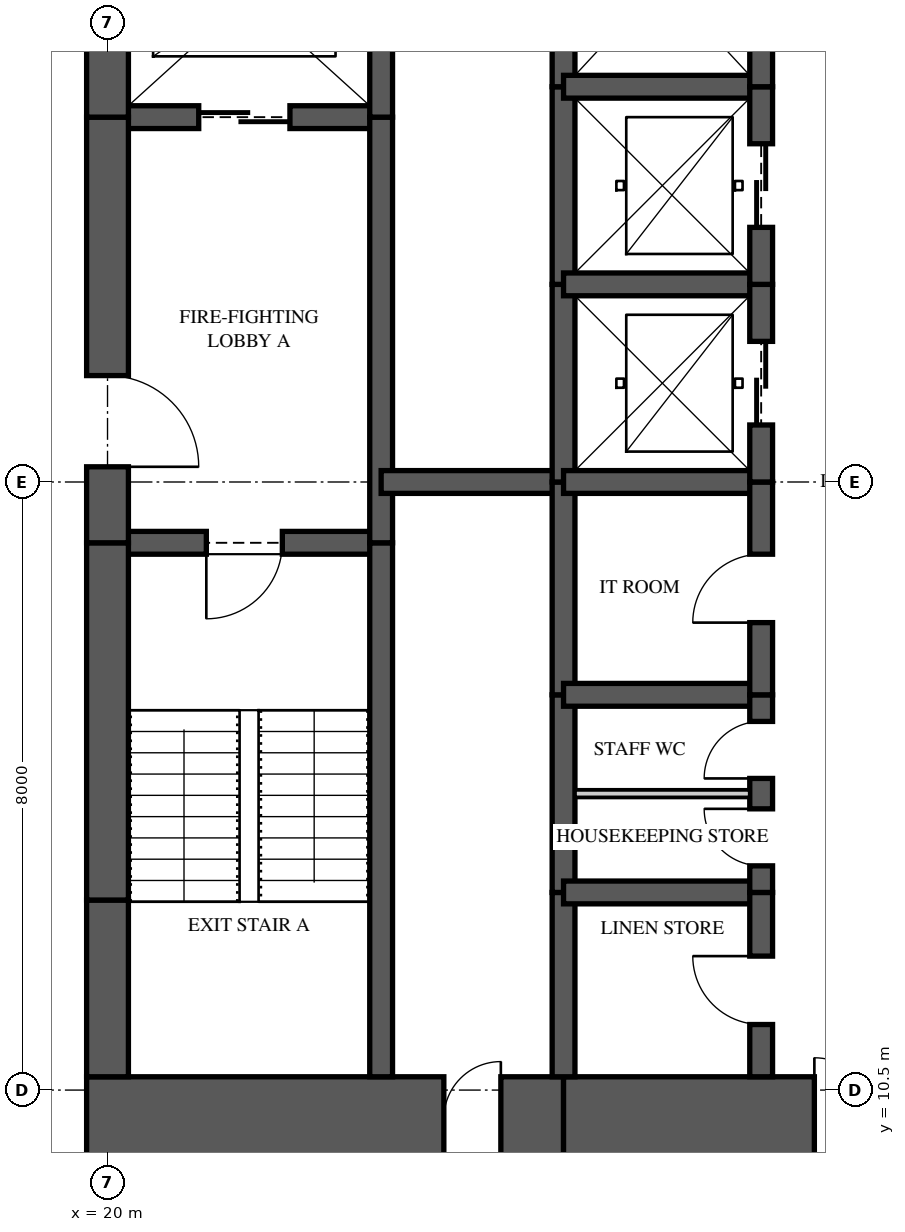
"""IFC4 building model, lengths in metres.
Left out: names, types, materials, properties, quantities, classifications, styles, units other than length and angle.
Written with IfcOpenShell. Run it as: python <this file> out.ifc"""

import sys

from ifc_helpers import new_model, si_unit, direction, frame, frame_2d, origin, place, context, subcontext, project, spatial, rectangle, extrude, element, fill, save


model = new_model("IFC4")
c1 = context("Model", 3, precision=1e-05, world=origin(), true_north=direction((0.0, 1.0)))
c2 = subcontext(c1, "Body", "Model", "MODEL_VIEW")
j1 = project(units=[si_unit("LENGTHUNIT", "METRE"), si_unit("PLANEANGLEUNIT", "RADIAN")], contexts=[c1])
p1 = place(None, origin())
s1 = spatial("IfcSite", under=j1, at=p1, CompositionType="ELEMENT")
p2 = place(p1, origin())
s2 = spatial("IfcBuilding", under=s1, at=p2, CompositionType="ELEMENT")
p3 = place(p2, frame((0.0, 0.0, 245.95)))
s3 = spatial("IfcBuildingStorey", under=s2, at=p3, CompositionType="ELEMENT", Elevation=245.95)
p4 = place(p3, frame((19.725, 10.125, 0.0), z_axis=(0.0, 0.0, 1.0), x_axis=(1.0, 0.0, 0.0)))
e1 = element("IfcWall", 1, at=p4, inside=s3, PredefinedType="SHEAR", context=c2, shape_type="SweptSolid", body=[
    extrude(rectangle(XDim=6.275, YDim=1.1, at=frame_2d((3.137, 0.0))), origin(), (0.0, 0.0, 1.0), 3.5),
])
p5 = place(p4, frame((4.7, 0.0, 0.0)))
e2 = element("IfcOpeningElement", 2, at=p5, cuts=e1, PredefinedType="OPENING", context=c2, shape_type="SweptSolid", body=[
    extrude(rectangle(XDim=0.75, YDim=2.1, at=frame_2d((0.375, 1.05))), frame((0.0, 0.56, 0.0), z_axis=(0.0, -1.0, 0.0), x_axis=(1.0, 0.0, 0.0)), (0.0, 0.0, 1.0), 1.12),
])
p6 = place(p3, frame((26.0, 10.125, 0.0), z_axis=(0.0, 0.0, 1.0), x_axis=(1.0, 0.0, 0.0)))
e3 = element("IfcWall", 3, at=p6, inside=s3, PredefinedType="SHEAR", context=c2, shape_type="SweptSolid", body=[
    extrude(rectangle(XDim=5.6, YDim=1.1, at=frame_2d((2.8, 0.0))), origin(), (0.0, 0.0, 1.0), 3.5),
])
p7 = place(p6, frame((3.3, 0.0, 0.0)))
e4 = element("IfcOpeningElement", 4, at=p7, cuts=e3, PredefinedType="OPENING", context=c2, shape_type="SweptSolid", body=[
    extrude(rectangle(XDim=1.6, YDim=2.1, at=frame_2d((0.8, 1.05))), frame((0.0, 0.56, 0.0), z_axis=(0.0, -1.0, 0.0), x_axis=(1.0, 0.0, 0.0)), (0.0, 0.0, 1.0), 1.12),
])
p8 = place(p3, frame((20.0, 26.325, 0.0), z_axis=(0.0, 0.0, 1.0), x_axis=(0.0, -1.0, 0.0)))
e5 = element("IfcWall", 5, at=p8, inside=s3, PredefinedType="SHEAR", context=c2, shape_type="SweptSolid", body=[
    extrude(rectangle(XDim=3.025, YDim=0.55, at=frame_2d((1.512, 0.0))), origin(), (0.0, 0.0, 1.0), 3.5),
])
p9 = place(p3, frame((20.0, 23.3, 0.0), z_axis=(0.0, 0.0, 1.0), x_axis=(0.0, -1.0, 0.0)))
e6 = element("IfcWall", 6, at=p9, inside=s3, PredefinedType="SHEAR", context=c2, shape_type="SweptSolid", body=[
    extrude(rectangle(XDim=5.6, YDim=0.55, at=frame_2d((2.8, 0.0))), origin(), (0.0, 0.0, 1.0), 3.5),
])
p10 = place(p9, frame((3.4, 0.0, 0.0)))
e7 = element("IfcOpeningElement", 7, at=p10, cuts=e6, PredefinedType="OPENING", context=c2, shape_type="SweptSolid", body=[
    extrude(rectangle(XDim=1.2, YDim=2.2, at=frame_2d((0.6, 1.1))), frame((0.0, 0.285, 0.0), z_axis=(0.0, -1.0, 0.0), x_axis=(1.0, 0.0, 0.0)), (0.0, 0.0, 1.0), 0.57),
])
p11 = place(p3, frame((20.0, 17.7, 0.0), z_axis=(0.0, 0.0, 1.0), x_axis=(0.0, -1.0, 0.0)))
e8 = element("IfcWall", 8, at=p11, inside=s3, PredefinedType="SHEAR", context=c2, shape_type="SweptSolid", body=[
    extrude(rectangle(XDim=4.7, YDim=0.55, at=frame_2d((2.35, 0.0))), origin(), (0.0, 0.0, 1.0), 3.5),
])
p12 = place(p3, frame((20.0, 13.0, 0.0), z_axis=(0.0, 0.0, 1.0), x_axis=(0.0, -1.0, 0.0)))
e9 = element("IfcWall", 9, at=p12, inside=s3, PredefinedType="SHEAR", context=c2, shape_type="SweptSolid", body=[
    extrude(rectangle(XDim=2.325, YDim=0.55, at=frame_2d((1.163, 0.0))), origin(), (0.0, 0.0, 1.0), 3.5),
])
p13 = place(p3, frame((23.6, 10.675, 0.0), z_axis=(0.0, 0.0, 1.0), x_axis=(0.0, 1.0, 0.0)))
e10 = element("IfcWall", 10, at=p13, inside=s3, PredefinedType="SHEAR", context=c2, shape_type="SweptSolid", body=[
    extrude(rectangle(XDim=7.025, YDim=0.3, at=frame_2d((3.512, 0.0))), origin(), (0.0, 0.0, 1.0), 3.5),
])
p14 = place(p3, frame((23.6, 17.7, 0.0), z_axis=(0.0, 0.0, 1.0), x_axis=(0.0, 1.0, 0.0)))
e11 = element("IfcWall", 11, at=p14, inside=s3, PredefinedType="SHEAR", context=c2, shape_type="SweptSolid", body=[
    extrude(rectangle(XDim=5.6, YDim=0.3, at=frame_2d((2.8, 0.0))), origin(), (0.0, 0.0, 1.0), 3.5),
])
p15 = place(p3, frame((23.6, 23.3, 0.0), z_axis=(0.0, 0.0, 1.0), x_axis=(0.0, 1.0, 0.0)))
e12 = element("IfcWall", 12, at=p15, inside=s3, PredefinedType="SHEAR", context=c2, shape_type="SweptSolid", body=[
    extrude(rectangle(XDim=3.025, YDim=0.3, at=frame_2d((1.512, 0.0))), origin(), (0.0, 0.0, 1.0), 3.5),
])
p16 = place(p3, frame((26.0, 10.675, 0.0), z_axis=(0.0, 0.0, 1.0), x_axis=(0.0, 1.0, 0.0)))
e13 = element("IfcWall", 13, at=p16, inside=s3, PredefinedType="SHEAR", context=c2, shape_type="SweptSolid", body=[
    extrude(rectangle(XDim=2.425, YDim=0.3, at=frame_2d((1.212, 0.0))), origin(), (0.0, 0.0, 1.0), 3.5),
])
p17 = place(p3, frame((26.0, 13.1, 0.0), z_axis=(0.0, 0.0, 1.0), x_axis=(0.0, 1.0, 0.0)))
e14 = element("IfcWall", 14, at=p17, inside=s3, PredefinedType="SHEAR", context=c2, shape_type="SweptSolid", body=[
    extrude(rectangle(XDim=2.6, YDim=0.3, at=frame_2d((1.3, 0.0))), origin(), (0.0, 0.0, 1.0), 3.5),
])
p18 = place(p3, frame((26.0, 15.7, 0.0), z_axis=(0.0, 0.0, 1.0), x_axis=(0.0, 1.0, 0.0)))
e15 = element("IfcWall", 15, at=p18, inside=s3, PredefinedType="SHEAR", context=c2, shape_type="SweptSolid", body=[
    extrude(rectangle(XDim=2.8, YDim=0.3, at=frame_2d((1.4, 0.0))), origin(), (0.0, 0.0, 1.0), 3.5),
])
p19 = place(p3, frame((26.0, 18.5, 0.0), z_axis=(0.0, 0.0, 1.0), x_axis=(0.0, 1.0, 0.0)))
e16 = element("IfcWall", 16, at=p19, inside=s3, PredefinedType="SHEAR", context=c2, shape_type="SweptSolid", body=[
    extrude(rectangle(XDim=2.6, YDim=0.3, at=frame_2d((1.3, 0.0))), origin(), (0.0, 0.0, 1.0), 3.5),
])
p20 = place(p3, frame((26.0, 21.1, 0.0), z_axis=(0.0, 0.0, 1.0), x_axis=(0.0, 1.0, 0.0)))
e17 = element("IfcWall", 17, at=p20, inside=s3, PredefinedType="SHEAR", context=c2, shape_type="SweptSolid", body=[
    extrude(rectangle(XDim=2.6, YDim=0.3, at=frame_2d((1.3, 0.0))), origin(), (0.0, 0.0, 1.0), 3.5),
])
p21 = place(p3, frame((26.0, 23.7, 0.0), z_axis=(0.0, 0.0, 1.0), x_axis=(0.0, 1.0, 0.0)))
e18 = element("IfcWall", 18, at=p21, inside=s3, PredefinedType="SHEAR", context=c2, shape_type="SweptSolid", body=[
    extrude(rectangle(XDim=2.625, YDim=0.3, at=frame_2d((1.312, 0.0))), origin(), (0.0, 0.0, 1.0), 3.5),
])
p22 = place(p3, frame((28.6, 10.675, 0.0), z_axis=(0.0, 0.0, 1.0), x_axis=(0.0, 1.0, 0.0)))
e19 = element("IfcWall", 19, at=p22, inside=s3, PredefinedType="SHEAR", context=c2, shape_type="SweptSolid", body=[
    extrude(rectangle(XDim=2.425, YDim=0.3, at=frame_2d((1.212, 0.0))), origin(), (0.0, 0.0, 1.0), 3.5),
])
p23 = place(p22, frame((0.688, 0.0, 0.0)))
e20 = element("IfcOpeningElement", 20, at=p23, cuts=e19, PredefinedType="OPENING", context=c2, shape_type="SweptSolid", body=[
    extrude(rectangle(XDim=0.9, YDim=2.1, at=frame_2d((0.45, 1.05))), frame((0.0, 0.16, 0.0), z_axis=(0.0, -1.0, 0.0), x_axis=(1.0, 0.0, 0.0)), (0.0, 0.0, 1.0), 0.32),
])
p24 = place(p3, frame((28.6, 13.1, 0.0), z_axis=(0.0, 0.0, 1.0), x_axis=(0.0, 1.0, 0.0)))
e21 = element("IfcWall", 21, at=p24, inside=s3, PredefinedType="SHEAR", context=c2, shape_type="SweptSolid", body=[
    extrude(rectangle(XDim=2.6, YDim=0.3, at=frame_2d((1.3, 0.0))), origin(), (0.0, 0.0, 1.0), 3.5),
])
p25 = place(p24, frame((0.35, 0.0, 0.0)))
e22 = element("IfcOpeningElement", 22, at=p25, cuts=e21, PredefinedType="OPENING", context=c2, shape_type="SweptSolid", body=[
    extrude(rectangle(XDim=0.75, YDim=2.1, at=frame_2d((0.375, 1.05))), frame((0.0, 0.16, 0.0), z_axis=(0.0, -1.0, 0.0), x_axis=(1.0, 0.0, 0.0)), (0.0, 0.0, 1.0), 0.32),
])
p26 = place(p24, frame((1.5, 0.0, 0.0)))
e23 = element("IfcOpeningElement", 23, at=p26, cuts=e21, PredefinedType="OPENING", context=c2, shape_type="SweptSolid", body=[
    extrude(rectangle(XDim=0.75, YDim=2.1, at=frame_2d((0.375, 1.05))), frame((0.0, 0.16, 0.0), z_axis=(0.0, -1.0, 0.0), x_axis=(1.0, 0.0, 0.0)), (0.0, 0.0, 1.0), 0.32),
])
p27 = place(p3, frame((28.6, 15.7, 0.0), z_axis=(0.0, 0.0, 1.0), x_axis=(0.0, 1.0, 0.0)))
e24 = element("IfcWall", 24, at=p27, inside=s3, PredefinedType="SHEAR", context=c2, shape_type="SweptSolid", body=[
    extrude(rectangle(XDim=2.8, YDim=0.3, at=frame_2d((1.4, 0.0))), origin(), (0.0, 0.0, 1.0), 3.5),
])
p28 = place(p27, frame((0.95, 0.0, 0.0)))
e25 = element("IfcOpeningElement", 25, at=p28, cuts=e24, PredefinedType="OPENING", context=c2, shape_type="SweptSolid", body=[
    extrude(rectangle(XDim=0.9, YDim=2.1, at=frame_2d((0.45, 1.05))), frame((0.0, 0.16, 0.0), z_axis=(0.0, -1.0, 0.0), x_axis=(1.0, 0.0, 0.0)), (0.0, 0.0, 1.0), 0.32),
])
p29 = place(p3, frame((28.6, 18.5, 0.0), z_axis=(0.0, 0.0, 1.0), x_axis=(0.0, 1.0, 0.0)))
e26 = element("IfcWall", 26, at=p29, inside=s3, PredefinedType="SHEAR", context=c2, shape_type="SweptSolid", body=[
    extrude(rectangle(XDim=2.6, YDim=0.3, at=frame_2d((1.3, 0.0))), origin(), (0.0, 0.0, 1.0), 3.5),
])
p30 = place(p29, frame((0.75, 0.0, 0.0)))
e27 = element("IfcOpeningElement", 27, at=p30, cuts=e26, PredefinedType="OPENING", context=c2, shape_type="SweptSolid", body=[
    extrude(rectangle(XDim=1.1, YDim=2.1, at=frame_2d((0.55, 1.05))), frame((0.0, 0.16, 0.0), z_axis=(0.0, -1.0, 0.0), x_axis=(1.0, 0.0, 0.0)), (0.0, 0.0, 1.0), 0.32),
])
p31 = place(p3, frame((28.6, 21.1, 0.0), z_axis=(0.0, 0.0, 1.0), x_axis=(0.0, 1.0, 0.0)))
e28 = element("IfcWall", 28, at=p31, inside=s3, PredefinedType="SHEAR", context=c2, shape_type="SweptSolid", body=[
    extrude(rectangle(XDim=2.6, YDim=0.3, at=frame_2d((1.3, 0.0))), origin(), (0.0, 0.0, 1.0), 3.5),
])
p32 = place(p31, frame((0.75, 0.0, 0.0)))
e29 = element("IfcOpeningElement", 29, at=p32, cuts=e28, PredefinedType="OPENING", context=c2, shape_type="SweptSolid", body=[
    extrude(rectangle(XDim=1.1, YDim=2.1, at=frame_2d((0.55, 1.05))), frame((0.0, 0.16, 0.0), z_axis=(0.0, -1.0, 0.0), x_axis=(1.0, 0.0, 0.0)), (0.0, 0.0, 1.0), 0.32),
])
p33 = place(p3, frame((28.6, 23.7, 0.0), z_axis=(0.0, 0.0, 1.0), x_axis=(0.0, 1.0, 0.0)))
e30 = element("IfcWall", 30, at=p33, inside=s3, PredefinedType="SHEAR", context=c2, shape_type="SweptSolid", body=[
    extrude(rectangle(XDim=2.625, YDim=0.3, at=frame_2d((1.312, 0.0))), origin(), (0.0, 0.0, 1.0), 3.5),
])
p34 = place(p33, frame((0.85, 0.0, 0.0)))
e31 = element("IfcOpeningElement", 31, at=p34, cuts=e30, PredefinedType="OPENING", context=c2, shape_type="SweptSolid", body=[
    extrude(rectangle(XDim=1.1, YDim=2.1, at=frame_2d((0.55, 1.05))), frame((0.0, 0.16, 0.0), z_axis=(0.0, -1.0, 0.0), x_axis=(1.0, 0.0, 0.0)), (0.0, 0.0, 1.0), 0.32),
])
p35 = place(p3, frame((20.0, 17.7, 0.0), z_axis=(0.0, 0.0, 1.0), x_axis=(1.0, 0.0, 0.0)))
e32 = element("IfcWall", 32, at=p35, inside=s3, PredefinedType="SHEAR", context=c2, shape_type="SweptSolid", body=[
    extrude(rectangle(XDim=3.6, YDim=0.3, at=frame_2d((1.8, 0.0))), origin(), (0.0, 0.0, 1.0), 3.5),
])
p36 = place(p35, frame((1.3, 0.0, 0.0)))
e33 = element("IfcOpeningElement", 33, at=p36, cuts=e32, PredefinedType="OPENING", context=c2, shape_type="SweptSolid", body=[
    extrude(rectangle(XDim=1.0, YDim=2.1, at=frame_2d((0.5, 1.05))), frame((0.0, 0.16, 0.0), z_axis=(0.0, -1.0, 0.0), x_axis=(1.0, 0.0, 0.0)), (0.0, 0.0, 1.0), 0.32),
])
p37 = place(p3, frame((20.0, 23.3, 0.0), z_axis=(0.0, 0.0, 1.0), x_axis=(1.0, 0.0, 0.0)))
e34 = element("IfcWall", 34, at=p37, inside=s3, PredefinedType="SHEAR", context=c2, shape_type="SweptSolid", body=[
    extrude(rectangle(XDim=3.6, YDim=0.3, at=frame_2d((1.8, 0.0))), origin(), (0.0, 0.0, 1.0), 3.5),
])
p38 = place(p37, frame((1.2, 0.0, 0.0)))
e35 = element("IfcOpeningElement", 35, at=p38, cuts=e34, PredefinedType="OPENING", context=c2, shape_type="SweptSolid", body=[
    extrude(rectangle(XDim=1.2, YDim=2.1, at=frame_2d((0.6, 1.05))), frame((0.0, 0.16, 0.0), z_axis=(0.0, -1.0, 0.0), x_axis=(1.0, 0.0, 0.0)), (0.0, 0.0, 1.0), 0.32),
])
p39 = place(p3, frame((23.6, 18.5, 0.0), z_axis=(0.0, 0.0, 1.0), x_axis=(1.0, 0.0, 0.0)))
e36 = element("IfcWall", 36, at=p39, inside=s3, PredefinedType="SHEAR", context=c2, shape_type="SweptSolid", body=[
    extrude(rectangle(XDim=2.4, YDim=0.3, at=frame_2d((1.2, 0.0))), origin(), (0.0, 0.0, 1.0), 3.5),
])
for number, where, z_axis, x_axis in (
    (37, (26.0, 13.1, 0.0), (0.0, 0.0, 1.0), (1.0, 0.0, 0.0)),
    (38, (26.0, 15.7, 0.0), (0.0, 0.0, 1.0), (1.0, 0.0, 0.0)),
    (39, (26.0, 18.5, 0.0), (0.0, 0.0, 1.0), (1.0, 0.0, 0.0)),
    (40, (26.0, 21.1, 0.0), (0.0, 0.0, 1.0), (1.0, 0.0, 0.0)),
    (41, (26.0, 23.7, 0.0), (0.0, 0.0, 1.0), (1.0, 0.0, 0.0)),
):
    element("IfcWall", number, at=place(p3, frame(where, z_axis=z_axis, x_axis=x_axis)), inside=s3, PredefinedType="SHEAR", context=c2, shape_type="SweptSolid", body=[
        extrude(rectangle(XDim=2.6, YDim=0.3, at=frame_2d((1.3, 0.0))), origin(), (0.0, 0.0, 1.0), 3.5),
    ])
p40 = place(p3, frame((26.15, 14.4, 0.0), z_axis=(0.0, 0.0, 1.0), x_axis=(1.0, 0.0, 0.0)))
e42 = element("IfcWall", 42, at=p40, inside=s3, PredefinedType="PARTITIONING", context=c2, shape_type="SweptSolid", body=[
    extrude(rectangle(XDim=2.3, YDim=0.1, at=frame_2d((1.15, 0.0))), origin(), (0.0, 0.0, 1.0), 3.26),
])
p41 = place(p36, frame((1.0, 0.0, 0.0), z_axis=(0.0, 0.0, 1.0), x_axis=(-1.0, 0.0, 0.0)))
e43 = element("IfcDoor", 43, at=p41, inside=s3, OperationType="SINGLE_SWING_RIGHT", PredefinedType="DOOR", context=c2, shape_type="SweptSolid", body=[
    extrude(rectangle(XDim=1.0, YDim=2.1, at=frame_2d((0.5, 1.05))), frame((0.0, 0.025, 0.0), z_axis=(0.0, -1.0, 0.0), x_axis=(1.0, 0.0, 0.0)), (0.0, 0.0, 1.0), 0.05),
])
fill(e33, e43)
p42 = place(p10, origin())
e44 = element("IfcDoor", 44, at=p42, inside=s3, OperationType="SINGLE_SWING_RIGHT", PredefinedType="DOOR", context=c2, shape_type="SweptSolid", body=[
    extrude(rectangle(XDim=1.2, YDim=2.2, at=frame_2d((0.6, 1.1))), frame((0.0, 0.025, 0.0), z_axis=(0.0, -1.0, 0.0), x_axis=(1.0, 0.0, 0.0)), (0.0, 0.0, 1.0), 0.05),
])
fill(e7, e44)
p43 = place(p38, origin())
e45 = element("IfcDoor", 45, at=p43, inside=s3, OperationType="SLIDING_TO_LEFT", PredefinedType="DOOR", context=c2, shape_type="SweptSolid", body=[
    extrude(rectangle(XDim=1.2, YDim=2.1, at=frame_2d((0.6, 1.05))), frame((0.0, 0.025, 0.0), z_axis=(0.0, -1.0, 0.0), x_axis=(1.0, 0.0, 0.0)), (0.0, 0.0, 1.0), 0.05),
])
fill(e35, e45)
p44 = place(p30, origin())
e46 = element("IfcDoor", 46, at=p44, inside=s3, OperationType="SLIDING_TO_LEFT", PredefinedType="DOOR", context=c2, shape_type="SweptSolid", body=[
    extrude(rectangle(XDim=1.1, YDim=2.1, at=frame_2d((0.55, 1.05))), frame((0.0, 0.025, 0.0), z_axis=(0.0, -1.0, 0.0), x_axis=(1.0, 0.0, 0.0)), (0.0, 0.0, 1.0), 0.05),
])
fill(e27, e46)
p45 = place(p32, origin())
e47 = element("IfcDoor", 47, at=p45, inside=s3, OperationType="SLIDING_TO_LEFT", PredefinedType="DOOR", context=c2, shape_type="SweptSolid", body=[
    extrude(rectangle(XDim=1.1, YDim=2.1, at=frame_2d((0.55, 1.05))), frame((0.0, 0.025, 0.0), z_axis=(0.0, -1.0, 0.0), x_axis=(1.0, 0.0, 0.0)), (0.0, 0.0, 1.0), 0.05),
])
fill(e29, e47)
p46 = place(p23, origin())
e48 = element("IfcDoor", 48, at=p46, inside=s3, OperationType="SINGLE_SWING_RIGHT", PredefinedType="DOOR", context=c2, shape_type="SweptSolid", body=[
    extrude(rectangle(XDim=0.9, YDim=2.1, at=frame_2d((0.45, 1.05))), frame((0.0, 0.025, 0.0), z_axis=(0.0, -1.0, 0.0), x_axis=(1.0, 0.0, 0.0)), (0.0, 0.0, 1.0), 0.05),
])
fill(e20, e48)
p47 = place(p25, origin())
e49 = element("IfcDoor", 49, at=p47, inside=s3, OperationType="SINGLE_SWING_RIGHT", PredefinedType="DOOR", context=c2, shape_type="SweptSolid", body=[
    extrude(rectangle(XDim=0.75, YDim=2.1, at=frame_2d((0.375, 1.05))), frame((0.0, 0.025, 0.0), z_axis=(0.0, -1.0, 0.0), x_axis=(1.0, 0.0, 0.0)), (0.0, 0.0, 1.0), 0.05),
])
fill(e22, e49)
p48 = place(p26, origin())
e50 = element("IfcDoor", 50, at=p48, inside=s3, OperationType="SINGLE_SWING_LEFT", PredefinedType="DOOR", context=c2, shape_type="SweptSolid", body=[
    extrude(rectangle(XDim=0.75, YDim=2.1, at=frame_2d((0.375, 1.05))), frame((0.0, 0.025, 0.0), z_axis=(0.0, -1.0, 0.0), x_axis=(1.0, 0.0, 0.0)), (0.0, 0.0, 1.0), 0.05),
])
fill(e23, e50)
p49 = place(p28, origin())
e51 = element("IfcDoor", 51, at=p49, inside=s3, OperationType="SINGLE_SWING_LEFT", PredefinedType="DOOR", context=c2, shape_type="SweptSolid", body=[
    extrude(rectangle(XDim=0.9, YDim=2.1, at=frame_2d((0.45, 1.05))), frame((0.0, 0.025, 0.0), z_axis=(0.0, -1.0, 0.0), x_axis=(1.0, 0.0, 0.0)), (0.0, 0.0, 1.0), 0.05),
])
fill(e25, e51)
p50 = place(p7, origin())
e52 = element("IfcDoor", 52, at=p50, inside=s3, OperationType="DOUBLE_DOOR_SINGLE_SWING", PredefinedType="DOOR", context=c2, shape_type="SweptSolid", body=[
    extrude(rectangle(XDim=1.6, YDim=2.1, at=frame_2d((0.8, 1.05))), frame((0.0, 0.025, 0.0), z_axis=(0.0, -1.0, 0.0), x_axis=(1.0, 0.0, 0.0)), (0.0, 0.0, 1.0), 0.05),
])
fill(e4, e52)
p51 = place(p5, origin())
e53 = element("IfcDoor", 53, at=p51, inside=s3, OperationType="SINGLE_SWING_RIGHT", PredefinedType="DOOR", context=c2, shape_type="SweptSolid", body=[
    extrude(rectangle(XDim=0.75, YDim=2.1, at=frame_2d((0.375, 1.05))), frame((0.0, 0.025, 0.0), z_axis=(0.0, -1.0, 0.0), x_axis=(1.0, 0.0, 0.0)), (0.0, 0.0, 1.0), 0.05),
])
fill(e2, e53)
save(model, sys.argv[1])
